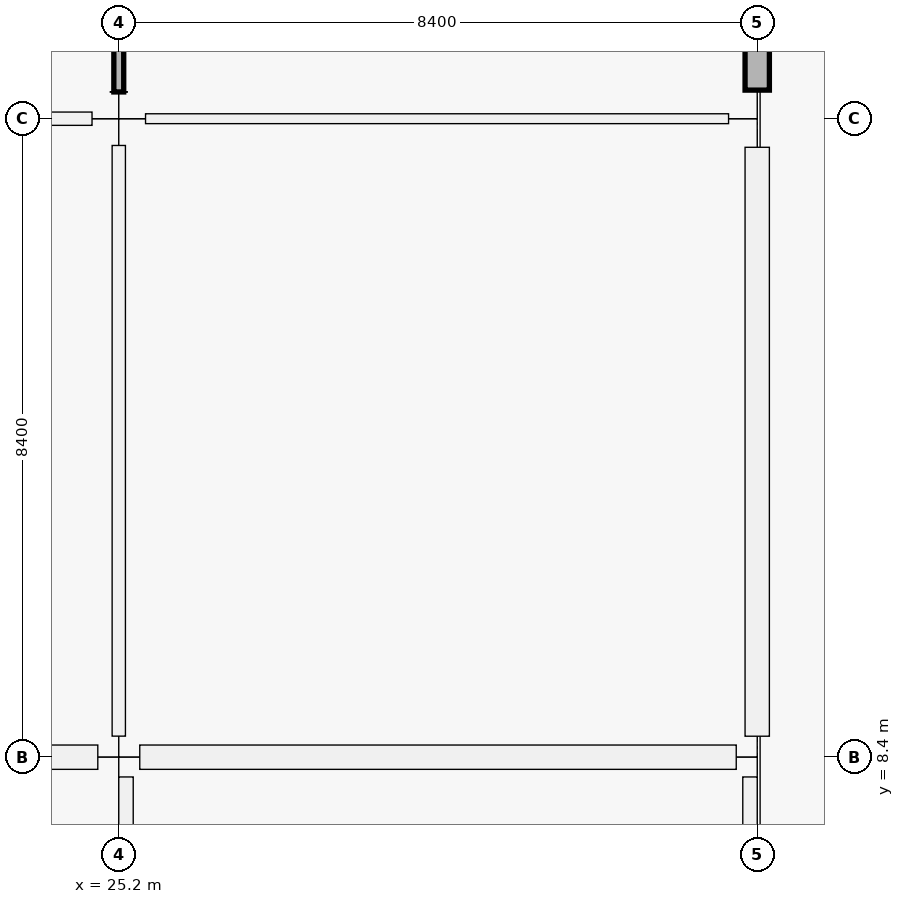
"""IFC4 building model, lengths in metres.
Left out: names, types, materials, properties, quantities, classifications, styles, units other than length and angle.
Written with IfcOpenShell. Run it as: python <this file> out.ifc"""

import sys

from ifc_helpers import new_model, si_unit, direction, frame, frame_2d, origin, origin_2d, place, context, subcontext, project, spatial, rectangle, extrude, element, fill, save


model = new_model("IFC4")
c1 = context("Model", 3, precision=1e-05, world=origin(), true_north=direction((0.0, 1.0)))
c2 = subcontext(c1, "Body", "Model", "MODEL_VIEW")
j1 = project(units=[si_unit("LENGTHUNIT", "METRE"), si_unit("PLANEANGLEUNIT", "RADIAN")], contexts=[c1])
p1 = place(None, origin())
s1 = spatial("IfcSite", under=j1, at=p1, CompositionType="ELEMENT")
p2 = place(p1, origin())
s2 = spatial("IfcBuilding", under=s1, at=p2, CompositionType="ELEMENT")
p3 = place(p2, frame((0.0, 0.0, 10.26)))
s3 = spatial("IfcBuildingStorey", under=s2, at=p3, CompositionType="ELEMENT", Elevation=10.26)
p4 = place(p3, frame((25.2, 8.4, 0.0), z_axis=(0.0, 0.0, 1.0), x_axis=(1.0, 0.0, 0.0)))
e1 = element("IfcColumn", 1, at=p4, inside=s3, PredefinedType="COLUMN", context=c2, shape_type="SweptSolid", body=[
    extrude(rectangle(XDim=0.55, YDim=0.55, at=origin_2d()), origin(), (0.0, 0.0, 1.0), 4.25),
])
p5 = place(p3, frame((25.2, 16.8, 0.0), z_axis=(0.0, 0.0, 1.0), x_axis=(1.0, 0.0, 0.0)))
e2 = element("IfcColumn", 2, at=p5, inside=s3, PredefinedType="COLUMN", context=c2, shape_type="SweptSolid", body=[
    extrude(rectangle(XDim=0.7, YDim=0.7, at=origin_2d()), origin(), (0.0, 0.0, 1.0), 4.5),
])
p6 = place(p3, frame((33.6, 8.4, 0.0), z_axis=(0.0, 0.0, 1.0), x_axis=(1.0, 0.0, 0.0)))
e3 = element("IfcColumn", 3, at=p6, inside=s3, PredefinedType="COLUMN", context=c2, shape_type="SweptSolid", body=[
    extrude(rectangle(XDim=0.55, YDim=0.55, at=origin_2d()), origin(), (0.0, 0.0, 1.0), 4.25),
])
p7 = place(p3, frame((33.6, 16.8, 0.0), z_axis=(0.0, 0.0, 1.0), x_axis=(1.0, 0.0, 0.0)))
e4 = element("IfcColumn", 4, at=p7, inside=s3, PredefinedType="COLUMN", context=c2, shape_type="SweptSolid", body=[
    extrude(rectangle(XDim=0.75, YDim=0.75, at=origin_2d()), origin(), (0.0, 0.0, 1.0), 4.5),
])
p8 = place(p3, frame((24.924, 8.4, 0.0), z_axis=(0.0, 0.0, 1.0), x_axis=(-1.0, 0.0, 0.0)))
e5 = element("IfcWall", 5, at=p8, inside=s3, PredefinedType="SOLIDWALL", context=c2, shape_type="SweptSolid", body=[
    extrude(rectangle(XDim=7.848, YDim=0.32, at=frame_2d((3.924, 0.0))), origin(), (0.0, 0.0, 1.0), 3.54),
])
p9 = place(p8, frame((3.099, 0.0, 0.0)))
e6 = element("IfcOpeningElement", 6, at=p9, cuts=e5, PredefinedType="OPENING", context=c2, shape_type="SweptSolid", body=[
    extrude(rectangle(XDim=1.65, YDim=2.2, at=frame_2d((0.825, 1.1))), frame((0.0, 0.16, 0.0), z_axis=(0.0, -1.0, 0.0), x_axis=(1.0, 0.0, 0.0)), (0.0, 0.0, 1.0), 0.32),
])
p10 = place(p3, frame((33.324, 8.4, 0.0), z_axis=(0.0, 0.0, 1.0), x_axis=(-1.0, 0.0, 0.0)))
e7 = element("IfcWall", 7, at=p10, inside=s3, PredefinedType="SOLIDWALL", context=c2, shape_type="SweptSolid", body=[
    extrude(rectangle(XDim=7.848, YDim=0.32, at=frame_2d((3.924, 0.0))), origin(), (0.0, 0.0, 1.0), 3.54),
])
p11 = place(p10, frame((3.174, 0.0, 0.9)))
e8 = element("IfcOpeningElement", 8, at=p11, cuts=e7, PredefinedType="OPENING", context=c2, shape_type="SweptSolid", body=[
    extrude(rectangle(XDim=1.5, YDim=1.8, at=frame_2d((0.75, 0.9))), frame((0.0, 0.16, 0.0), z_axis=(0.0, -1.0, 0.0), x_axis=(1.0, 0.0, 0.0)), (0.0, 0.0, 1.0), 0.32),
])
p12 = place(p3, frame((33.6, 16.424, 0.0), z_axis=(0.0, 0.0, 1.0), x_axis=(0.0, -1.0, 0.0)))
e9 = element("IfcWall", 9, at=p12, inside=s3, PredefinedType="SOLIDWALL", context=c2, shape_type="SweptSolid", body=[
    extrude(rectangle(XDim=7.748, YDim=0.32, at=frame_2d((3.874, 0.0))), origin(), (0.0, 0.0, 1.0), 3.54),
])
p13 = place(p12, frame((3.074, 0.0, 0.9)))
e10 = element("IfcOpeningElement", 10, at=p13, cuts=e9, PredefinedType="OPENING", context=c2, shape_type="SweptSolid", body=[
    extrude(rectangle(XDim=1.6, YDim=2.1, at=frame_2d((0.8, 1.05))), frame((0.0, 0.16, 0.0), z_axis=(0.0, -1.0, 0.0), x_axis=(1.0, 0.0, 0.0)), (0.0, 0.0, 1.0), 0.32),
])
p14 = place(p3, frame((33.6, 24.849, 0.0), z_axis=(0.0, 0.0, 1.0), x_axis=(0.0, -1.0, 0.0)))
e11 = element("IfcWall", 11, at=p14, inside=s3, PredefinedType="SOLIDWALL", context=c2, shape_type="SweptSolid", body=[
    extrude(rectangle(XDim=7.673, YDim=0.32, at=frame_2d((3.836, 0.0))), origin(), (0.0, 0.0, 1.0), 3.54),
])
p15 = place(p14, frame((2.837, 0.0, 0.9)))
e12 = element("IfcOpeningElement", 12, at=p15, cuts=e11, PredefinedType="OPENING", context=c2, shape_type="SweptSolid", body=[
    extrude(rectangle(XDim=2.0, YDim=2.1, at=frame_2d((1.0, 1.05))), frame((0.0, 0.16, 0.0), z_axis=(0.0, -1.0, 0.0), x_axis=(1.0, 0.0, 0.0)), (0.0, 0.0, 1.0), 0.32),
])
for number, where, z_axis, x_axis in (
    (13, (25.295, 0.26, 0.0), (0.0, 0.0, 1.0), (0.0, 1.0, 0.0)),
    (14, (33.505, 8.14, 0.0), (0.0, 0.0, 1.0), (0.0, -1.0, 0.0)),
):
    element("IfcWall", number, at=place(p3, frame(where, z_axis=z_axis, x_axis=x_axis)), inside=s3, PredefinedType="PARAPET", context=c2, shape_type="SweptSolid", body=[
        extrude(rectangle(XDim=7.88, YDim=0.19, at=frame_2d((3.94, 0.0))), origin(), (0.0, 0.0, 1.0), 0.95),
    ])
p16 = place(p3, frame((17.177, 16.8, 0.0), z_axis=(0.0, 0.0, 1.0), x_axis=(1.0, 0.0, 0.0)))
e15 = element("IfcWall", 15, at=p16, inside=s3, PredefinedType="PARTITIONING", context=c2, shape_type="SweptSolid", body=[
    extrude(rectangle(XDim=7.671, YDim=0.175, at=frame_2d((3.835, 0.0))), origin(), (0.0, 0.0, 1.0), 3.37),
])
p17 = place(p16, frame((3.371, 0.0, 0.0)))
e16 = element("IfcOpeningElement", 16, at=p17, cuts=e15, PredefinedType="OPENING", context=c2, shape_type="SweptSolid", body=[
    extrude(rectangle(XDim=0.93, YDim=2.12, at=frame_2d((0.465, 1.06))), frame((0.0, 0.087, 0.0), z_axis=(0.0, -1.0, 0.0), x_axis=(1.0, 0.0, 0.0)), (0.0, 0.0, 1.0), 0.175),
])
p18 = place(p3, frame((25.552, 16.8, 0.0), z_axis=(0.0, 0.0, 1.0), x_axis=(1.0, 0.0, 0.0)))
e17 = element("IfcWall", 17, at=p18, inside=s3, PredefinedType="MOVABLE", context=c2, shape_type="SweptSolid", body=[
    extrude(rectangle(XDim=7.671, YDim=0.13, at=frame_2d((3.835, 0.0))), origin(), (0.0, 0.0, 1.0), 3.37),
])
p19 = place(p18, frame((3.296, 0.0, 0.0)))
e18 = element("IfcOpeningElement", 18, at=p19, cuts=e17, PredefinedType="OPENING", context=c2, shape_type="SweptSolid", body=[
    extrude(rectangle(XDim=1.08, YDim=2.25, at=frame_2d((0.54, 1.125))), frame((0.0, 0.065, 0.0), z_axis=(0.0, -1.0, 0.0), x_axis=(1.0, 0.0, 0.0)), (0.0, 0.0, 1.0), 0.13),
])
p20 = place(p3, frame((25.2, 8.677, 0.0), z_axis=(0.0, 0.0, 1.0), x_axis=(0.0, 1.0, 0.0)))
e19 = element("IfcWall", 19, at=p20, inside=s3, PredefinedType="PARTITIONING", context=c2, shape_type="SweptSolid", body=[
    extrude(rectangle(XDim=7.771, YDim=0.175, at=frame_2d((3.885, 0.0))), origin(), (0.0, 0.0, 1.0), 3.37),
])
p21 = place(p20, frame((3.385, 0.0, 0.0)))
e20 = element("IfcOpeningElement", 20, at=p21, cuts=e19, PredefinedType="OPENING", context=c2, shape_type="SweptSolid", body=[
    extrude(rectangle(XDim=1.0, YDim=2.2, at=frame_2d((0.5, 1.1))), frame((0.0, 0.087, 0.0), z_axis=(0.0, -1.0, 0.0), x_axis=(1.0, 0.0, 0.0)), (0.0, 0.0, 1.0), 0.175),
])
p22 = place(p3, frame((25.2, 17.152, 0.0), z_axis=(0.0, 0.0, 1.0), x_axis=(0.0, 1.0, 0.0)))
e21 = element("IfcWall", 21, at=p22, inside=s3, PredefinedType="MOVABLE", context=c2, shape_type="SweptSolid", body=[
    extrude(rectangle(XDim=7.671, YDim=0.13, at=frame_2d((3.835, 0.0))), origin(), (0.0, 0.0, 1.0), 3.37),
])
p23 = place(p22, frame((3.346, 0.0, 0.0)))
e22 = element("IfcOpeningElement", 22, at=p23, cuts=e21, PredefinedType="OPENING", context=c2, shape_type="SweptSolid", body=[
    extrude(rectangle(XDim=0.98, YDim=2.18, at=frame_2d((0.49, 1.09))), frame((0.0, 0.065, 0.0), z_axis=(0.0, -1.0, 0.0), x_axis=(1.0, 0.0, 0.0)), (0.0, 0.0, 1.0), 0.13),
])
p24 = place(p11, origin())
e23 = element("IfcWindow", 23, at=p24, inside=s3, PartitioningType="SINGLE_PANEL", PredefinedType="WINDOW", context=c2, shape_type="SweptSolid", body=[
    extrude(rectangle(XDim=1.5, YDim=1.8, at=frame_2d((0.75, 0.9))), frame((0.0, 0.03, 0.0), z_axis=(0.0, -1.0, 0.0), x_axis=(1.0, 0.0, 0.0)), (0.0, 0.0, 1.0), 0.06),
])
fill(e8, e23)
p25 = place(p13, origin())
e24 = element("IfcWindow", 24, at=p25, inside=s3, PartitioningType="SINGLE_PANEL", PredefinedType="WINDOW", context=c2, shape_type="SweptSolid", body=[
    extrude(rectangle(XDim=1.6, YDim=2.1, at=frame_2d((0.8, 1.05))), frame((0.0, 0.03, 0.0), z_axis=(0.0, -1.0, 0.0), x_axis=(1.0, 0.0, 0.0)), (0.0, 0.0, 1.0), 0.06),
])
fill(e10, e24)
p26 = place(p19, origin())
e25 = element("IfcDoor", 25, at=p26, inside=s3, OperationType="SINGLE_SWING_RIGHT", PredefinedType="DOOR", context=c2, shape_type="SweptSolid", body=[
    extrude(rectangle(XDim=1.08, YDim=2.25, at=frame_2d((0.54, 1.125))), frame((0.0, 0.025, 0.0), z_axis=(0.0, -1.0, 0.0), x_axis=(1.0, 0.0, 0.0)), (0.0, 0.0, 1.0), 0.05),
])
fill(e18, e25)
p27 = place(p21, origin())
e26 = element("IfcDoor", 26, at=p27, inside=s3, OperationType="SINGLE_SWING_RIGHT", PredefinedType="DOOR", context=c2, shape_type="SweptSolid", body=[
    extrude(rectangle(XDim=1.0, YDim=2.2, at=frame_2d((0.5, 1.1))), frame((0.0, 0.025, 0.0), z_axis=(0.0, -1.0, 0.0), x_axis=(1.0, 0.0, 0.0)), (0.0, 0.0, 1.0), 0.05),
])
fill(e20, e26)
save(model, sys.argv[1])
